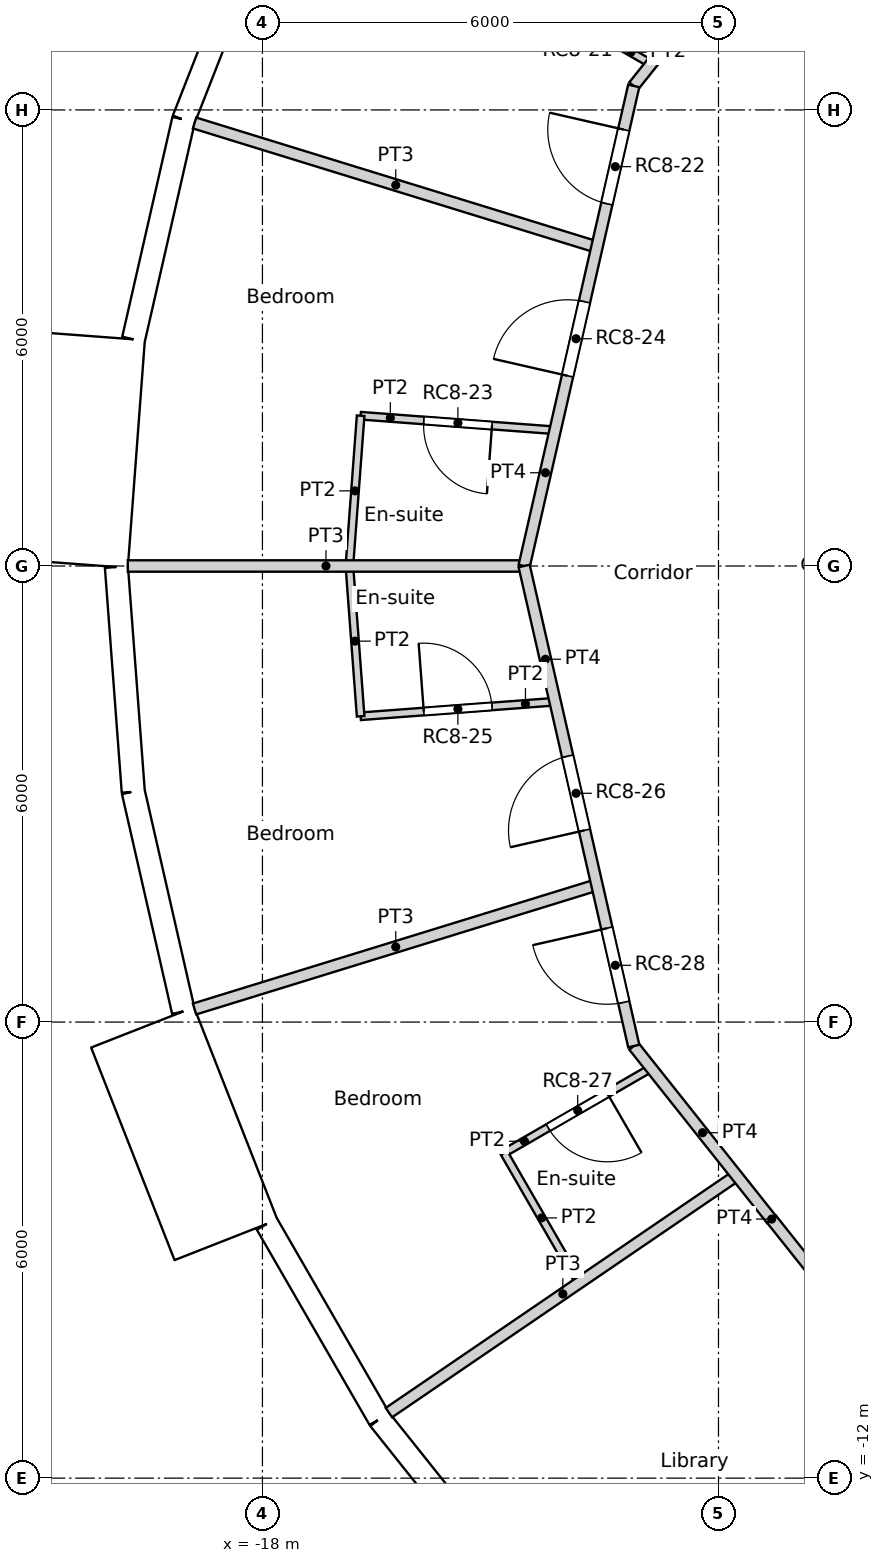
"""IFC4 building model, lengths in metres.
Left out: names, types, materials, properties, quantities, classifications, styles, units other than length and angle.
Written with IfcOpenShell. Run it as: python <this file> out.ifc"""

import sys

from ifc_helpers import new_model, si_unit, direction, frame, frame_2d, origin, origin_2d, place, context, subcontext, project, spatial, rectangle, circle, extrude, element, fill, save


model = new_model("IFC4")
c1 = context("Model", 3, precision=1e-05, world=origin(), true_north=direction((0.0, 1.0)))
c2 = subcontext(c1, "Body", "Model", "MODEL_VIEW")
j1 = project(units=[si_unit("LENGTHUNIT", "METRE"), si_unit("PLANEANGLEUNIT", "RADIAN")], contexts=[c1])
p1 = place(None, origin())
s1 = spatial("IfcSite", under=j1, at=p1, CompositionType="ELEMENT")
p2 = place(p1, origin())
s2 = spatial("IfcBuilding", under=s1, at=p2, CompositionType="ELEMENT")
p3 = place(p2, frame((0.0, 0.0, 305.4)))
s3 = spatial("IfcBuildingStorey", under=s2, at=p3, CompositionType="ELEMENT", Elevation=305.4)
for number, where, z_axis, x_axis in (
    (1, (-18.612, 2.805, 0.0), (0.0, 0.0, 1.0), (1.0, 0.0, 0.0)),
    (2, (-18.612, -2.805, 0.0), (0.0, 0.0, 1.0), (1.0, 0.0, 0.0)),
    (3, (-16.958, -8.167, 0.0), (0.0, 0.0, 1.0), (1.0, 0.0, 0.0)),
):
    element("IfcColumn", number, at=place(p3, frame(where, z_axis=z_axis, x_axis=x_axis)), inside=s3, PredefinedType="COLUMN", context=c2, shape_type="SweptSolid", body=[
        extrude(circle(Radius=0.45, at=origin_2d()), origin(), (0.0, 0.0, 1.0), 3.6),
    ])
p4 = place(p3, frame((-17.955, 8.629, 0.0), z_axis=(0.0, 0.0, 1.0), x_axis=(-0.36530043032, -0.930889679612, 0.0)))
e4 = element("IfcWall", 4, at=p4, inside=s3, PredefinedType="SOLIDWALL", context=c2, shape_type="SweptSolid", body=[
    extrude(rectangle(XDim=2.962, YDim=0.3, at=frame_2d((1.481, 0.0))), origin(), (0.0, 0.0, 1.0), 2.8),
])
p5 = place(p4, frame((1.481, 0.0, 1.55)))
e5 = element("IfcOpeningElement", 5, at=p5, cuts=e4, PredefinedType="OPENING", context=c2, shape_type="SweptSolid", body=[
    extrude(circle(Radius=0.9, at=origin_2d()), frame((0.0, 0.16, 0.0), z_axis=(0.0, -1.0, 0.0), x_axis=(1.0, 0.0, 0.0)), (0.0, 0.0, 1.0), 0.32),
])
p6 = place(p3, frame((-19.037, 5.872, 0.0), z_axis=(0.0, 0.0, 1.0), x_axis=(-0.222529389789, -0.974925982155, 0.0)))
e6 = element("IfcWall", 6, at=p6, inside=s3, PredefinedType="SOLIDWALL", context=c2, shape_type="SweptSolid", body=[
    extrude(rectangle(XDim=2.962, YDim=0.3, at=frame_2d((1.481, 0.0))), origin(), (0.0, 0.0, 1.0), 3.25),
])
p7 = place(p6, frame((1.481, 0.0, 1.55)))
e7 = element("IfcOpeningElement", 7, at=p7, cuts=e6, PredefinedType="OPENING", context=c2, shape_type="SweptSolid", body=[
    extrude(circle(Radius=0.9, at=origin_2d()), frame((0.0, 0.16, 0.0), z_axis=(0.0, -1.0, 0.0), x_axis=(1.0, 0.0, 0.0)), (0.0, 0.0, 1.0), 0.32),
])
p8 = place(p3, frame((-20.272, 3.023, -0.35), z_axis=(0.0, 0.0, 1.0), x_axis=(-0.074785902127, -0.997199613339, 0.0)))
e8 = element("IfcWall", 8, at=p8, inside=s3, PredefinedType="ELEMENTEDWALL", context=c2, shape_type="SweptSolid", body=[
    extrude(rectangle(XDim=3.0, YDim=1.45, at=frame_2d((1.5, 0.0))), origin(), (0.0, 0.0, 1.0), 3.6),
])
p9 = place(p8, frame((1.5, 0.0, 1.9)))
e9 = element("IfcOpeningElement", 9, at=p9, cuts=e8, PredefinedType="OPENING", context=c2, shape_type="SweptSolid", body=[
    extrude(circle(Radius=0.9, at=origin_2d()), frame((0.0, 0.735, 0.0), z_axis=(0.0, -1.0, 0.0), x_axis=(1.0, 0.0, 0.0)), (0.0, 0.0, 1.0), 1.47),
])
p10 = place(p3, frame((-19.921, -0.015, 0.0), z_axis=(0.0, 0.0, 1.0), x_axis=(0.07474897196, -0.997202382263, 0.0)))
e10 = element("IfcWall", 10, at=p10, inside=s3, PredefinedType="SOLIDWALL", context=c2, shape_type="SweptSolid", body=[
    extrude(rectangle(XDim=2.962, YDim=0.3, at=frame_2d((1.481, 0.0))), origin(), (0.0, 0.0, 1.0), 2.8),
])
p11 = place(p10, frame((1.481, 0.0, 1.55)))
e11 = element("IfcOpeningElement", 11, at=p11, cuts=e10, PredefinedType="OPENING", context=c2, shape_type="SweptSolid", body=[
    extrude(circle(Radius=0.9, at=origin_2d()), frame((0.0, 0.16, 0.0), z_axis=(0.0, -1.0, 0.0), x_axis=(1.0, 0.0, 0.0)), (0.0, 0.0, 1.0), 0.32),
])
p12 = place(p3, frame((-19.699, -2.969, 0.0), z_axis=(0.0, 0.0, 1.0), x_axis=(0.222529389789, -0.974925982155, 0.0)))
e12 = element("IfcWall", 12, at=p12, inside=s3, PredefinedType="SOLIDWALL", context=c2, shape_type="SweptSolid", body=[
    extrude(rectangle(XDim=2.962, YDim=0.3, at=frame_2d((1.481, 0.0))), origin(), (0.0, 0.0, 1.0), 3.25),
])
p13 = place(p12, frame((1.481, 0.0, 1.55)))
e13 = element("IfcOpeningElement", 13, at=p13, cuts=e12, PredefinedType="OPENING", context=c2, shape_type="SweptSolid", body=[
    extrude(circle(Radius=0.9, at=origin_2d()), frame((0.0, 0.16, 0.0), z_axis=(0.0, -1.0, 0.0), x_axis=(1.0, 0.0, 0.0)), (0.0, 0.0, 1.0), 0.32),
])
p14 = place(p3, frame((-19.576, -6.072, -0.35), z_axis=(0.0, 0.0, 1.0), x_axis=(0.36537792632, -0.93085926485, 0.0)))
e14 = element("IfcWall", 14, at=p14, inside=s3, PredefinedType="ELEMENTEDWALL", context=c2, shape_type="SweptSolid", body=[
    extrude(rectangle(XDim=3.0, YDim=1.45, at=frame_2d((1.5, 0.0))), origin(), (0.0, 0.0, 1.0), 3.6),
])
p15 = place(p14, frame((1.5, 0.0, 1.9)))
e15 = element("IfcOpeningElement", 15, at=p15, cuts=e14, PredefinedType="OPENING", context=c2, shape_type="SweptSolid", body=[
    extrude(circle(Radius=0.9, at=origin_2d()), frame((0.0, 0.735, 0.0), z_axis=(0.0, -1.0, 0.0), x_axis=(1.0, 0.0, 0.0)), (0.0, 0.0, 1.0), 1.47),
])
p16 = place(p3, frame((-17.941, -8.657, 0.0), z_axis=(0.0, 0.0, 1.0), x_axis=(0.499950756475, -0.86605383268, 0.0)))
e16 = element("IfcWall", 16, at=p16, inside=s3, PredefinedType="SOLIDWALL", context=c2, shape_type="SweptSolid", body=[
    extrude(rectangle(XDim=2.962, YDim=0.3, at=frame_2d((1.481, 0.0))), origin(), (0.0, 0.0, 1.0), 2.8),
])
p17 = place(p16, frame((1.481, 0.0, 1.55)))
e17 = element("IfcOpeningElement", 17, at=p17, cuts=e16, PredefinedType="OPENING", context=c2, shape_type="SweptSolid", body=[
    extrude(circle(Radius=0.9, at=origin_2d()), frame((0.0, 0.16, 0.0), z_axis=(0.0, -1.0, 0.0), x_axis=(1.0, 0.0, 0.0)), (0.0, 0.0, 1.0), 0.32),
])
p18 = place(p3, frame((-16.46, -11.222, 0.0), z_axis=(0.0, 0.0, 1.0), x_axis=(0.623498236992, -0.781824755599, 0.0)))
e18 = element("IfcWall", 18, at=p18, inside=s3, PredefinedType="SOLIDWALL", context=c2, shape_type="SweptSolid", body=[
    extrude(rectangle(XDim=2.962, YDim=0.3, at=frame_2d((1.481, 0.0))), origin(), (0.0, 0.0, 1.0), 3.25),
])
p19 = place(p18, frame((1.481, 0.0, 1.55)))
e19 = element("IfcOpeningElement", 19, at=p19, cuts=e18, PredefinedType="OPENING", context=c2, shape_type="SweptSolid", body=[
    extrude(circle(Radius=0.9, at=origin_2d()), frame((0.0, 0.16, 0.0), z_axis=(0.0, -1.0, 0.0), x_axis=(1.0, 0.0, 0.0)), (0.0, 0.0, 1.0), 0.32),
])
p20 = place(p3, frame((-11.3, -8.596, 0.0), z_axis=(0.0, 0.0, 1.0), x_axis=(0.623165080354, -0.782090328944, 0.0)))
e20 = element("IfcWall", 20, at=p20, inside=s3, PredefinedType="PARTITIONING", context=c2, shape_type="SweptSolid", body=[
    extrude(rectangle(XDim=3.564, YDim=0.15, at=frame_2d((1.782, 0.0))), origin(), (0.0, 0.0, 1.0), 3.25),
])
p21 = place(p3, frame((-11.3, -8.596, 0.0), z_axis=(0.0, 0.0, 1.0), x_axis=(0.0, 1.0, 0.0)))
e21 = element("IfcWall", 21, at=p21, inside=s3, PredefinedType="PARTITIONING", context=c2, shape_type="SweptSolid", body=[
    extrude(rectangle(XDim=0.009, YDim=0.15, at=frame_2d((0.005, 0.0))), origin(), (0.0, 0.0, 1.0), 3.25),
])
p22 = place(p3, frame((-13.115, 6.316, 0.0), z_axis=(0.0, 0.0, 1.0), x_axis=(0.623560523309, 0.781775078761, 0.0)))
e22 = element("IfcWall", 22, at=p22, inside=s3, PredefinedType="PARTITIONING", context=c2, shape_type="SweptSolid", body=[
    extrude(rectangle(XDim=3.177, YDim=0.15, at=frame_2d((1.589, 0.0))), origin(), (0.0, 0.0, 1.0), 3.25),
])
p23 = place(p3, frame((-14.557, 0.0, 0.0), z_axis=(0.0, 0.0, 1.0), x_axis=(0.222533159771, 0.974925121639, 0.0)))
e23 = element("IfcWall", 23, at=p23, inside=s3, PredefinedType="PARTITIONING", context=c2, shape_type="SweptSolid", body=[
    extrude(rectangle(XDim=6.478, YDim=0.15, at=frame_2d((3.239, 0.0))), origin(), (0.0, 0.0, 1.0), 3.25),
])
p24 = place(p23, frame((4.889, 0.0, 0.0)))
e24 = element("IfcOpeningElement", 24, at=p24, cuts=e23, PredefinedType="OPENING", context=c2, shape_type="SweptSolid", body=[
    extrude(rectangle(XDim=1.0, YDim=2.1, at=frame_2d((0.5, 1.05))), frame((0.0, 0.075, 0.0), z_axis=(0.0, -1.0, 0.0), x_axis=(1.0, 0.0, 0.0)), (0.0, 0.0, 1.0), 0.15),
])
p25 = place(p23, frame((2.567, 0.0, 0.0)))
e25 = element("IfcOpeningElement", 25, at=p25, cuts=e23, PredefinedType="OPENING", context=c2, shape_type="SweptSolid", body=[
    extrude(rectangle(XDim=1.0, YDim=2.1, at=frame_2d((0.5, 1.05))), frame((0.0, 0.075, 0.0), z_axis=(0.0, -1.0, 0.0), x_axis=(1.0, 0.0, 0.0)), (0.0, 0.0, 1.0), 0.15),
])
p26 = place(p3, frame((-14.557, 0.0, 0.0), z_axis=(0.0, 0.0, 1.0), x_axis=(0.222568978642, -0.97491694505, 0.0)))
e26 = element("IfcWall", 26, at=p26, inside=s3, PredefinedType="PARTITIONING", context=c2, shape_type="SweptSolid", body=[
    extrude(rectangle(XDim=6.479, YDim=0.15, at=frame_2d((3.239, 0.0))), origin(), (0.0, 0.0, 1.0), 3.25),
])
p27 = place(p26, frame((2.567, 0.0, 0.0)))
e27 = element("IfcOpeningElement", 27, at=p27, cuts=e26, PredefinedType="OPENING", context=c2, shape_type="SweptSolid", body=[
    extrude(rectangle(XDim=1.0, YDim=2.1, at=frame_2d((0.5, 1.05))), frame((0.0, 0.075, 0.0), z_axis=(0.0, -1.0, 0.0), x_axis=(1.0, 0.0, 0.0)), (0.0, 0.0, 1.0), 0.15),
])
p28 = place(p26, frame((4.888, 0.0, 0.0)))
e28 = element("IfcOpeningElement", 28, at=p28, cuts=e26, PredefinedType="OPENING", context=c2, shape_type="SweptSolid", body=[
    extrude(rectangle(XDim=1.0, YDim=2.1, at=frame_2d((0.5, 1.05))), frame((0.0, 0.075, 0.0), z_axis=(0.0, -1.0, 0.0), x_axis=(1.0, 0.0, 0.0)), (0.0, 0.0, 1.0), 0.15),
])
p29 = place(p3, frame((-13.115, -6.316, 0.0), z_axis=(0.0, 0.0, 1.0), x_axis=(0.622042479172, -0.782983495423, 0.0)))
e29 = element("IfcWall", 29, at=p29, inside=s3, PredefinedType="PARTITIONING", context=c2, shape_type="SweptSolid", body=[
    extrude(rectangle(XDim=2.911, YDim=0.15, at=frame_2d((1.456, 0.0))), origin(), (0.0, 0.0, 1.0), 3.25),
])
p30 = place(p3, frame((-14.82, 7.722, 0.0), z_axis=(0.0, 0.0, 1.0), x_axis=(0.866076416361, -0.499911633214, 0.0)))
e30 = element("IfcWall", 30, at=p30, inside=s3, PredefinedType="PARTITIONING", context=c2, shape_type="SweptSolid", body=[
    extrude(rectangle(XDim=2.234, YDim=0.1, at=frame_2d((1.117, 0.0))), origin(), (0.0, 0.0, 1.0), 3.25),
])
p31 = place(p30, frame((0.667, 0.0, 0.0)))
e31 = element("IfcOpeningElement", 31, at=p31, cuts=e30, PredefinedType="OPENING", context=c2, shape_type="SweptSolid", body=[
    extrude(rectangle(XDim=0.9, YDim=2.04, at=frame_2d((0.45, 1.02))), frame((0.0, 0.05, 0.0), z_axis=(0.0, -1.0, 0.0), x_axis=(1.0, 0.0, 0.0)), (0.0, 0.0, 1.0), 0.1),
])
p32 = place(p3, frame((-18.893, 5.828, 0.0), z_axis=(0.0, 0.0, 1.0), x_axis=(0.955580602693, -0.294729896274, 0.0)))
e32 = element("IfcWall", 32, at=p32, inside=s3, PredefinedType="PARTITIONING", context=c2, shape_type="SweptSolid", body=[
    extrude(rectangle(XDim=5.54, YDim=0.15, at=frame_2d((2.77, 0.0))), origin(), (0.0, 0.0, 1.0), 3.25),
])
p33 = place(p3, frame((-16.708, 1.977, 0.0), z_axis=(0.0, 0.0, 1.0), x_axis=(0.997193275785, -0.074870359477, 0.0)))
e33 = element("IfcWall", 33, at=p33, inside=s3, PredefinedType="PARTITIONING", context=c2, shape_type="SweptSolid", body=[
    extrude(rectangle(XDim=2.566, YDim=0.1, at=frame_2d((1.283, 0.0))), origin(), (0.0, 0.0, 1.0), 3.25),
])
p34 = place(p33, frame((0.833, 0.0, 0.0)))
e34 = element("IfcOpeningElement", 34, at=p34, cuts=e33, PredefinedType="OPENING", context=c2, shape_type="SweptSolid", body=[
    extrude(rectangle(XDim=0.9, YDim=2.04, at=frame_2d((0.45, 1.02))), frame((0.0, 0.05, 0.0), z_axis=(0.0, -1.0, 0.0), x_axis=(1.0, 0.0, 0.0)), (0.0, 0.0, 1.0), 0.1),
])
p35 = place(p3, frame((-16.856, 0.0, 0.0), z_axis=(0.0, 0.0, 1.0), x_axis=(0.074624634103, 0.997211694669, 0.0)))
e35 = element("IfcWall", 35, at=p35, inside=s3, PredefinedType="PARTITIONING", context=c2, shape_type="SweptSolid", body=[
    extrude(rectangle(XDim=1.983, YDim=0.1, at=frame_2d((0.991, 0.0))), origin(), (0.0, 0.0, 1.0), 3.25),
])
p36 = place(p3, frame((-19.771, 0.0, 0.0), z_axis=(0.0, 0.0, 1.0), x_axis=(1.0, 0.0, 0.0)))
e36 = element("IfcWall", 36, at=p36, inside=s3, PredefinedType="PARTITIONING", context=c2, shape_type="SweptSolid", body=[
    extrude(rectangle(XDim=5.214, YDim=0.15, at=frame_2d((2.607, 0.0))), origin(), (0.0, 0.0, 1.0), 3.25),
])
p37 = place(p3, frame((-16.856, 0.0, 0.0), z_axis=(0.0, 0.0, 1.0), x_axis=(0.074624634103, -0.997211694669, 0.0)))
e37 = element("IfcWall", 37, at=p37, inside=s3, PredefinedType="PARTITIONING", context=c2, shape_type="SweptSolid", body=[
    extrude(rectangle(XDim=1.983, YDim=0.1, at=frame_2d((0.991, 0.0))), origin(), (0.0, 0.0, 1.0), 3.25),
])
p38 = place(p3, frame((-16.708, -1.977, 0.0), z_axis=(0.0, 0.0, 1.0), x_axis=(0.997193275785, 0.074870359477, 0.0)))
e38 = element("IfcWall", 38, at=p38, inside=s3, PredefinedType="PARTITIONING", context=c2, shape_type="SweptSolid", body=[
    extrude(rectangle(XDim=2.566, YDim=0.1, at=frame_2d((1.283, 0.0))), origin(), (0.0, 0.0, 1.0), 3.25),
])
p39 = place(p38, frame((0.833, 0.0, 0.0)))
e39 = element("IfcOpeningElement", 39, at=p39, cuts=e38, PredefinedType="OPENING", context=c2, shape_type="SweptSolid", body=[
    extrude(rectangle(XDim=0.9, YDim=2.04, at=frame_2d((0.45, 1.02))), frame((0.0, 0.05, 0.0), z_axis=(0.0, -1.0, 0.0), x_axis=(1.0, 0.0, 0.0)), (0.0, 0.0, 1.0), 0.1),
])
p40 = place(p3, frame((-18.893, -5.828, 0.0), z_axis=(0.0, 0.0, 1.0), x_axis=(0.955580602693, 0.294729896274, 0.0)))
e40 = element("IfcWall", 40, at=p40, inside=s3, PredefinedType="PARTITIONING", context=c2, shape_type="SweptSolid", body=[
    extrude(rectangle(XDim=5.54, YDim=0.15, at=frame_2d((2.77, 0.0))), origin(), (0.0, 0.0, 1.0), 3.25),
])
p41 = place(p3, frame((-14.82, -7.722, 0.0), z_axis=(0.0, 0.0, 1.0), x_axis=(0.866076416361, 0.499911633214, 0.0)))
e41 = element("IfcWall", 41, at=p41, inside=s3, PredefinedType="PARTITIONING", context=c2, shape_type="SweptSolid", body=[
    extrude(rectangle(XDim=2.234, YDim=0.1, at=frame_2d((1.117, 0.0))), origin(), (0.0, 0.0, 1.0), 3.25),
])
p42 = place(p41, frame((0.667, 0.0, 0.0)))
e42 = element("IfcOpeningElement", 42, at=p42, cuts=e41, PredefinedType="OPENING", context=c2, shape_type="SweptSolid", body=[
    extrude(rectangle(XDim=0.9, YDim=2.04, at=frame_2d((0.45, 1.02))), frame((0.0, 0.05, 0.0), z_axis=(0.0, -1.0, 0.0), x_axis=(1.0, 0.0, 0.0)), (0.0, 0.0, 1.0), 0.1),
])
p43 = place(p3, frame((-14.82, -7.722, 0.0), z_axis=(0.0, 0.0, 1.0), x_axis=(0.500143626598, -0.865942465048, 0.0)))
e43 = element("IfcWall", 43, at=p43, inside=s3, PredefinedType="PARTITIONING", context=c2, shape_type="SweptSolid", body=[
    extrude(rectangle(XDim=1.974, YDim=0.1, at=frame_2d((0.987, 0.0))), origin(), (0.0, 0.0, 1.0), 3.25),
])
p44 = place(p3, frame((-16.336, -11.138, 0.0), z_axis=(0.0, 0.0, 1.0), x_axis=(0.82615274451, 0.563446219917, 0.0)))
e44 = element("IfcWall", 44, at=p44, inside=s3, PredefinedType="PARTITIONING", context=c2, shape_type="SweptSolid", body=[
    extrude(rectangle(XDim=5.54, YDim=0.15, at=frame_2d((2.77, 0.0))), origin(), (0.0, 0.0, 1.0), 3.25),
])
p45 = place(p5, origin())
e45 = element("IfcWindow", 45, at=p45, inside=s3, PartitioningType="SINGLE_PANEL", PredefinedType="WINDOW", context=c2, shape_type="SweptSolid", body=[
    extrude(circle(Radius=0.9, at=origin_2d()), frame((0.0, 0.12, 0.0), z_axis=(0.0, -1.0, 0.0), x_axis=(1.0, 0.0, 0.0)), (0.0, 0.0, 1.0), 0.1),
])
fill(e5, e45)
p46 = place(p7, origin())
e46 = element("IfcWindow", 46, at=p46, inside=s3, PartitioningType="SINGLE_PANEL", PredefinedType="WINDOW", context=c2, shape_type="SweptSolid", body=[
    extrude(circle(Radius=0.9, at=origin_2d()), frame((0.0, 0.12, 0.0), z_axis=(0.0, -1.0, 0.0), x_axis=(1.0, 0.0, 0.0)), (0.0, 0.0, 1.0), 0.1),
])
fill(e7, e46)
p47 = place(p9, origin())
e47 = element("IfcWindow", 47, at=p47, inside=s3, PartitioningType="SINGLE_PANEL", PredefinedType="WINDOW", context=c2, shape_type="SweptSolid", body=[
    extrude(circle(Radius=0.9, at=origin_2d()), frame((0.0, 0.695, 0.0), z_axis=(0.0, -1.0, 0.0), x_axis=(1.0, 0.0, 0.0)), (0.0, 0.0, 1.0), 0.1),
])
fill(e9, e47)
p48 = place(p11, origin())
e48 = element("IfcWindow", 48, at=p48, inside=s3, PartitioningType="SINGLE_PANEL", PredefinedType="WINDOW", context=c2, shape_type="SweptSolid", body=[
    extrude(circle(Radius=0.9, at=origin_2d()), frame((0.0, 0.12, 0.0), z_axis=(0.0, -1.0, 0.0), x_axis=(1.0, 0.0, 0.0)), (0.0, 0.0, 1.0), 0.1),
])
fill(e11, e48)
p49 = place(p13, origin())
e49 = element("IfcWindow", 49, at=p49, inside=s3, PartitioningType="SINGLE_PANEL", PredefinedType="WINDOW", context=c2, shape_type="SweptSolid", body=[
    extrude(circle(Radius=0.9, at=origin_2d()), frame((0.0, 0.12, 0.0), z_axis=(0.0, -1.0, 0.0), x_axis=(1.0, 0.0, 0.0)), (0.0, 0.0, 1.0), 0.1),
])
fill(e13, e49)
p50 = place(p15, origin())
e50 = element("IfcWindow", 50, at=p50, inside=s3, PartitioningType="SINGLE_PANEL", PredefinedType="WINDOW", context=c2, shape_type="SweptSolid", body=[
    extrude(circle(Radius=0.9, at=origin_2d()), frame((0.0, 0.695, 0.0), z_axis=(0.0, -1.0, 0.0), x_axis=(1.0, 0.0, 0.0)), (0.0, 0.0, 1.0), 0.1),
])
fill(e15, e50)
p51 = place(p17, origin())
e51 = element("IfcWindow", 51, at=p51, inside=s3, PartitioningType="SINGLE_PANEL", PredefinedType="WINDOW", context=c2, shape_type="SweptSolid", body=[
    extrude(circle(Radius=0.9, at=origin_2d()), frame((0.0, 0.12, 0.0), z_axis=(0.0, -1.0, 0.0), x_axis=(1.0, 0.0, 0.0)), (0.0, 0.0, 1.0), 0.1),
])
fill(e17, e51)
p52 = place(p19, origin())
e52 = element("IfcWindow", 52, at=p52, inside=s3, PartitioningType="SINGLE_PANEL", PredefinedType="WINDOW", context=c2, shape_type="SweptSolid", body=[
    extrude(circle(Radius=0.9, at=origin_2d()), frame((0.0, 0.12, 0.0), z_axis=(0.0, -1.0, 0.0), x_axis=(1.0, 0.0, 0.0)), (0.0, 0.0, 1.0), 0.1),
])
fill(e19, e52)
p53 = place(p24, origin())
e53 = element("IfcDoor", 53, at=p53, inside=s3, OperationType="SINGLE_SWING_RIGHT", PredefinedType="DOOR", context=c2, shape_type="SweptSolid", body=[
    extrude(rectangle(XDim=1.0, YDim=2.1, at=frame_2d((0.5, 1.05))), frame((0.0, 0.025, 0.0), z_axis=(0.0, -1.0, 0.0), x_axis=(1.0, 0.0, 0.0)), (0.0, 0.0, 1.0), 0.05),
])
fill(e24, e53)
p54 = place(p34, origin())
e54 = element("IfcDoor", 54, at=p54, inside=s3, OperationType="SINGLE_SWING_LEFT", PredefinedType="DOOR", context=c2, shape_type="SweptSolid", body=[
    extrude(rectangle(XDim=0.9, YDim=2.04, at=frame_2d((0.45, 1.02))), frame((0.0, 0.025, 0.0), z_axis=(0.0, -1.0, 0.0), x_axis=(1.0, 0.0, 0.0)), (0.0, 0.0, 1.0), 0.05),
])
fill(e34, e54)
p55 = place(p25, origin())
e55 = element("IfcDoor", 55, at=p55, inside=s3, OperationType="SINGLE_SWING_LEFT", PredefinedType="DOOR", context=c2, shape_type="SweptSolid", body=[
    extrude(rectangle(XDim=1.0, YDim=2.1, at=frame_2d((0.5, 1.05))), frame((0.0, 0.025, 0.0), z_axis=(0.0, -1.0, 0.0), x_axis=(1.0, 0.0, 0.0)), (0.0, 0.0, 1.0), 0.05),
])
fill(e25, e55)
p56 = place(p39, origin())
e56 = element("IfcDoor", 56, at=p56, inside=s3, OperationType="SINGLE_SWING_LEFT", PredefinedType="DOOR", context=c2, shape_type="SweptSolid", body=[
    extrude(rectangle(XDim=0.9, YDim=2.04, at=frame_2d((0.45, 1.02))), frame((0.0, 0.025, 0.0), z_axis=(0.0, -1.0, 0.0), x_axis=(1.0, 0.0, 0.0)), (0.0, 0.0, 1.0), 0.05),
])
fill(e39, e56)
p57 = place(p27, origin())
e57 = element("IfcDoor", 57, at=p57, inside=s3, OperationType="SINGLE_SWING_LEFT", PredefinedType="DOOR", context=c2, shape_type="SweptSolid", body=[
    extrude(rectangle(XDim=1.0, YDim=2.1, at=frame_2d((0.5, 1.05))), frame((0.0, 0.025, 0.0), z_axis=(0.0, -1.0, 0.0), x_axis=(1.0, 0.0, 0.0)), (0.0, 0.0, 1.0), 0.05),
])
fill(e27, e57)
p58 = place(p42, origin())
e58 = element("IfcDoor", 58, at=p58, inside=s3, OperationType="SINGLE_SWING_LEFT", PredefinedType="DOOR", context=c2, shape_type="SweptSolid", body=[
    extrude(rectangle(XDim=0.9, YDim=2.04, at=frame_2d((0.45, 1.02))), frame((0.0, 0.025, 0.0), z_axis=(0.0, -1.0, 0.0), x_axis=(1.0, 0.0, 0.0)), (0.0, 0.0, 1.0), 0.05),
])
fill(e42, e58)
p59 = place(p28, origin())
e59 = element("IfcDoor", 59, at=p59, inside=s3, OperationType="SINGLE_SWING_RIGHT", PredefinedType="DOOR", context=c2, shape_type="SweptSolid", body=[
    extrude(rectangle(XDim=1.0, YDim=2.1, at=frame_2d((0.5, 1.05))), frame((0.0, 0.025, 0.0), z_axis=(0.0, -1.0, 0.0), x_axis=(1.0, 0.0, 0.0)), (0.0, 0.0, 1.0), 0.05),
])
fill(e28, e59)
save(model, sys.argv[1])
